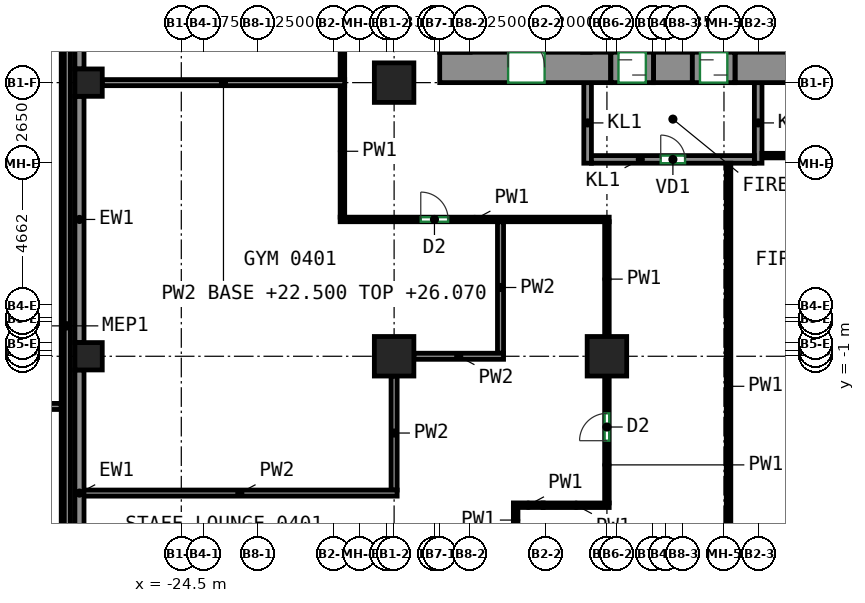
"""IFC4 building model, lengths in metres.
Left out: names, types, materials, properties, quantities, classifications, styles, units other than length and angle.
Written with IfcOpenShell. Run it as: python <this file> out.ifc"""

import sys

from ifc_helpers import new_model, si_unit, direction, frame, frame_2d, origin, origin_2d, place, context, subcontext, project, spatial, rectangle, extrude, source, transform, mapped, element, fill, save


model = new_model("IFC4")
c1 = context("Model", 3, precision=1e-05, world=origin(), true_north=direction((0.0, 1.0)))
c2 = subcontext(c1, "Body", "Model", "MODEL_VIEW")
j1 = project(units=[si_unit("LENGTHUNIT", "METRE"), si_unit("PLANEANGLEUNIT", "RADIAN")], contexts=[c1])
p1 = place(None, origin())
s1 = spatial("IfcSite", under=j1, at=p1, CompositionType="ELEMENT")
p2 = place(p1, origin())
s2 = spatial("IfcBuilding", under=s1, at=p2, CompositionType="ELEMENT")
p3 = place(p2, frame((0.0, 0.0, 22.5)))
s3 = spatial("IfcBuildingStorey", under=s2, at=p3, CompositionType="ELEMENT", Elevation=22.5)
m1 = source(origin(), c2, "Body", "SweptSolid", [
    extrude(rectangle(XDim=0.9, YDim=0.9, at=origin_2d()), origin(), (0.0, 0.0, 1.0), 4.22),
])
for number, where, z_axis, x_axis in (
    (1, (-27.55, -1.0, 0.0), (0.0, 0.0, 1.0), (1.0, 0.0, 0.0)),
    (2, (-27.55, 8.0, 0.0), (0.0, 0.0, 1.0), (1.0, 0.0, 0.0)),
):
    element("IfcColumn", number, at=place(p3, frame(where, z_axis=z_axis, x_axis=x_axis)), inside=s3, PredefinedType="COLUMN", context=c2, shape_type="MappedRepresentation", body=[
        mapped(m1, transform((0.0, 0.0, 0.0))),
    ])
m2 = source(origin(), c2, "Body", "SweptSolid", [
    extrude(rectangle(XDim=1.3, YDim=1.3, at=origin_2d()), origin(), (0.0, 0.0, 1.0), 4.22),
])
for number, where, z_axis, x_axis in (
    (3, (-17.5, -1.0, 0.0), (0.0, 0.0, 1.0), (1.0, 0.0, 0.0)),
    (4, (-17.5, 8.0, 0.0), (0.0, 0.0, 1.0), (1.0, 0.0, 0.0)),
    (5, (-10.5, -1.0, 0.0), (0.0, 0.0, 1.0), (1.0, 0.0, 0.0)),
):
    element("IfcColumn", number, at=place(p3, frame(where, z_axis=z_axis, x_axis=x_axis)), inside=s3, PredefinedType="COLUMN", context=c2, shape_type="MappedRepresentation", body=[
        mapped(m2, transform((0.0, 0.0, 0.0))),
    ])
m3 = source(origin(), c2, "Body", "SweptSolid", [
    extrude(rectangle(XDim=5.63, YDim=1.0, at=frame_2d((2.815, 0.0))), origin(), (0.0, 0.0, 1.0), 4.22),
])
p4 = place(p3, frame((-16.0, 8.5, 0.0), z_axis=(0.0, 0.0, 1.0), x_axis=(1.0, 0.0, 0.0)))
e6 = element("IfcWall", 6, at=p4, inside=s3, PredefinedType="SHEAR", context=c2, shape_type="MappedRepresentation", body=[
    mapped(m3, transform((0.0, 0.0, 0.0))),
])
p5 = place(p4, frame((2.25, 0.0, 0.0)))
e7 = element("IfcOpeningElement", 7, at=p5, cuts=e6, PredefinedType="OPENING", context=c2, shape_type="SweptSolid", body=[
    extrude(rectangle(XDim=1.2, YDim=2.1, at=frame_2d((0.6, 1.05))), frame((0.0, 0.51, 0.0), z_axis=(0.0, -1.0, 0.0), x_axis=(1.0, 0.0, 0.0)), (0.0, 0.0, 1.0), 1.02),
])
m4 = source(origin(), c2, "Body", "SweptSolid", [
    extrude(rectangle(XDim=1.28, YDim=1.0, at=frame_2d((0.64, 0.0))), origin(), (0.0, 0.0, 1.0), 4.22),
])
p6 = place(p3, frame((-8.97, 8.5, 0.0), z_axis=(0.0, 0.0, 1.0), x_axis=(1.0, 0.0, 0.0)))
e8 = element("IfcWall", 8, at=p6, inside=s3, PredefinedType="SHEAR", context=c2, shape_type="MappedRepresentation", body=[
    mapped(m4, transform((0.0, 0.0, 0.0))),
])
m5 = source(origin(), c2, "Body", "SweptSolid", [
    extrude(rectangle(XDim=14.18, YDim=1.0, at=frame_2d((7.09, 0.0))), origin(), (0.0, 0.0, 1.0), 4.22),
])
p7 = place(p3, frame((-6.29, 8.5, 0.0), z_axis=(0.0, 0.0, 1.0), x_axis=(1.0, 0.0, 0.0)))
e9 = element("IfcWall", 9, at=p7, inside=s3, PredefinedType="SHEAR", context=c2, shape_type="MappedRepresentation", body=[
    mapped(m5, transform((0.0, 0.0, 0.0))),
])
m6 = source(origin(), c2, "Body", "SweptSolid", [
    extrude(rectangle(XDim=1.4, YDim=1.0, at=frame_2d((0.7, 0.0))), origin(), (0.0, 0.0, 1.0), 0.32),
])
p8 = place(p3, frame((-10.37, 8.5, 3.9), z_axis=(0.0, 0.0, 1.0), x_axis=(1.0, 0.0, 0.0)))
e10 = element("IfcWall", 10, at=p8, inside=s3, PredefinedType="SHEAR", context=c2, shape_type="MappedRepresentation", body=[
    mapped(m6, transform((0.0, 0.0, 0.0))),
])
m7 = source(origin(), c2, "Body", "SweptSolid", [
    extrude(rectangle(XDim=1.4, YDim=1.0, at=frame_2d((0.7, 0.0))), origin(), (0.0, 0.0, 1.0), 0.27),
])
p9 = place(p3, frame((-7.69, 8.5, 3.95), z_axis=(0.0, 0.0, 1.0), x_axis=(1.0, 0.0, 0.0)))
e11 = element("IfcWall", 11, at=p9, inside=s3, PredefinedType="SHEAR", context=c2, shape_type="MappedRepresentation", body=[
    mapped(m7, transform((0.0, 0.0, 0.0))),
])
m8 = source(origin(), c2, "Body", "SweptSolid", [
    extrude(rectangle(XDim=15.282, YDim=0.3, at=frame_2d((7.641, 0.0))), origin(), (0.0, 0.0, 1.0), 4.22),
])
p10 = place(p3, frame((-27.85, 23.732, 0.0), z_axis=(0.0, 0.0, 1.0), x_axis=(0.0, -1.0, 0.0)))
e12 = element("IfcWall", 12, at=p10, inside=s3, PredefinedType="SOLIDWALL", context=c2, shape_type="MappedRepresentation", body=[
    mapped(m8, transform((0.0, 0.0, 0.0))),
])
m9 = source(origin(), c2, "Body", "SweptSolid", [
    extrude(rectangle(XDim=8.1, YDim=0.3, at=frame_2d((4.05, 0.0))), origin(), (0.0, 0.0, 1.0), 4.22),
])
for number, where, z_axis, x_axis in (
    (13, (-27.85, 7.55, 0.0), (0.0, 0.0, 1.0), (0.0, -1.0, 0.0)),
    (14, (-27.85, -1.45, 0.0), (0.0, 0.0, 1.0), (0.0, -1.0, 0.0)),
):
    element("IfcWall", number, at=place(p3, frame(where, z_axis=z_axis, x_axis=x_axis)), inside=s3, PredefinedType="SOLIDWALL", context=c2, shape_type="MappedRepresentation", body=[
        mapped(m9, transform((0.0, 0.0, 0.0))),
    ])
m10 = source(origin(), c2, "Body", "SweptSolid", [
    extrude(rectangle(XDim=56.3, YDim=0.3, at=frame_2d((28.15, 0.0))), origin(), (0.0, 0.0, 1.0), 4.22),
])
p11 = place(p3, frame((-28.3, 28.15, 0.0), z_axis=(0.0, 0.0, 1.0), x_axis=(0.0, -1.0, 0.0)))
e15 = element("IfcWall", 15, at=p11, inside=s3, PredefinedType="SOLIDWALL", context=c2, shape_type="MappedRepresentation", body=[
    mapped(m10, transform((0.0, 0.0, 0.0))),
])
m11 = source(origin(), c2, "Body", "SweptSolid", [
    extrude(rectangle(XDim=56.3, YDim=0.2, at=frame_2d((28.15, 0.0))), origin(), (0.0, 0.0, 1.0), 1.1),
])
p12 = place(p3, frame((-28.25, 28.15, 4.5), z_axis=(0.0, 0.0, 1.0), x_axis=(0.0, -1.0, 0.0)))
e16 = element("IfcWall", 16, at=p12, inside=s3, PredefinedType="PARAPET", context=c2, shape_type="MappedRepresentation", body=[
    mapped(m11, transform((0.0, 0.0, 0.0))),
])
m12 = source(origin(), c2, "Body", "SweptSolid", [
    extrude(rectangle(XDim=2.65, YDim=0.25, at=frame_2d((1.325, 0.0))), origin(), (0.0, 0.0, 1.0), 4.22),
])
for number, where, z_axis, x_axis in (
    (17, (-11.135, 5.35, 0.0), (0.0, 0.0, 1.0), (0.0, 1.0, 0.0)),
    (18, (-5.525, 5.35, 0.0), (0.0, 0.0, 1.0), (0.0, 1.0, 0.0)),
):
    element("IfcWall", number, at=place(p3, frame(where, z_axis=z_axis, x_axis=x_axis)), inside=s3, PredefinedType="PARTITIONING", context=c2, shape_type="MappedRepresentation", body=[
        mapped(m12, transform((0.0, 0.0, 0.0))),
    ])
m13 = source(origin(), c2, "Body", "SweptSolid", [
    extrude(rectangle(XDim=5.36, YDim=0.25, at=frame_2d((2.68, 0.0))), origin(), (0.0, 0.0, 1.0), 4.22),
])
p13 = place(p3, frame((-11.01, 5.475, 0.0), z_axis=(0.0, 0.0, 1.0), x_axis=(1.0, 0.0, 0.0)))
e19 = element("IfcWall", 19, at=p13, inside=s3, PredefinedType="PARTITIONING", context=c2, shape_type="MappedRepresentation", body=[
    mapped(m13, transform((0.0, 0.0, 0.0))),
])
p14 = place(p13, frame((2.28, 0.0, 0.0)))
e20 = element("IfcOpeningElement", 20, at=p14, cuts=e19, PredefinedType="OPENING", context=c2, shape_type="SweptSolid", body=[
    extrude(rectangle(XDim=0.8, YDim=2.0, at=frame_2d((0.4, 1.0))), frame((0.0, 0.135, 0.0), z_axis=(0.0, -1.0, 0.0), x_axis=(1.0, 0.0, 0.0)), (0.0, 0.0, 1.0), 0.27),
])
m14 = source(origin(), c2, "Body", "SweptSolid", [
    extrude(rectangle(XDim=1.4, YDim=1.0, at=frame_2d((0.7, 0.0))), origin(), (0.0, 0.0, 1.0), 2.7),
])
p15 = place(p3, frame((-10.37, 8.5, 0.0), z_axis=(0.0, 0.0, 1.0), x_axis=(1.0, 0.0, 0.0)))
e21 = element("IfcWall", 21, at=p15, inside=s3, PredefinedType="PARTITIONING", context=c2, shape_type="MappedRepresentation", body=[
    mapped(m14, transform((0.0, 0.0, 0.0))),
])
p16 = place(p15, frame((0.25, 0.0, 0.0)))
e22 = element("IfcOpeningElement", 22, at=p16, cuts=e21, PredefinedType="OPENING", context=c2, shape_type="SweptSolid", body=[
    extrude(rectangle(XDim=0.9, YDim=2.1, at=frame_2d((0.45, 1.05))), frame((0.0, 0.51, 0.0), z_axis=(0.0, -1.0, 0.0), x_axis=(1.0, 0.0, 0.0)), (0.0, 0.0, 1.0), 1.02),
])
m15 = source(origin(), c2, "Body", "SweptSolid", [
    extrude(rectangle(XDim=1.4, YDim=1.0, at=frame_2d((0.7, 0.0))), origin(), (0.0, 0.0, 1.0), 2.7),
])
p17 = place(p3, frame((-7.69, 8.5, 0.0), z_axis=(0.0, 0.0, 1.0), x_axis=(1.0, 0.0, 0.0)))
e23 = element("IfcWall", 23, at=p17, inside=s3, PredefinedType="PARTITIONING", context=c2, shape_type="MappedRepresentation", body=[
    mapped(m15, transform((0.0, 0.0, 0.0))),
])
p18 = place(p17, frame((0.25, 0.0, 0.0)))
e24 = element("IfcOpeningElement", 24, at=p18, cuts=e23, PredefinedType="OPENING", context=c2, shape_type="SweptSolid", body=[
    extrude(rectangle(XDim=0.9, YDim=2.1, at=frame_2d((0.45, 1.05))), frame((0.0, 0.51, 0.0), z_axis=(0.0, -1.0, 0.0), x_axis=(1.0, 0.0, 0.0)), (0.0, 0.0, 1.0), 1.02),
])
p19 = place(p3, frame((-19.275, 3.5, 0.0), z_axis=(0.0, 0.0, 1.0), x_axis=(1.0, 0.0, 0.0)))
e25 = element("IfcWall", 25, at=p19, inside=s3, PredefinedType="PARTITIONING", context=c2, shape_type="SweptSolid", body=[
    extrude(rectangle(XDim=8.85, YDim=0.15, at=frame_2d((4.425, 0.0))), origin(), (0.0, 0.0, 1.0), 4.22),
])
p20 = place(p19, frame((2.652, 0.0, 0.0)))
e26 = element("IfcOpeningElement", 26, at=p20, cuts=e25, PredefinedType="OPENING", context=c2, shape_type="SweptSolid", body=[
    extrude(rectangle(XDim=0.9, YDim=2.1, at=frame_2d((0.45, 1.05))), frame((0.0, 0.085, 0.0), z_axis=(0.0, -1.0, 0.0), x_axis=(1.0, 0.0, 0.0)), (0.0, 0.0, 1.0), 0.17),
])
p21 = place(p3, frame((-19.2, 3.575, 0.0), z_axis=(0.0, 0.0, 1.0), x_axis=(0.0, 1.0, 0.0)))
e27 = element("IfcWall", 27, at=p21, inside=s3, PredefinedType="PARTITIONING", context=c2, shape_type="SweptSolid", body=[
    extrude(rectangle(XDim=4.335, YDim=0.15, at=frame_2d((2.167, 0.0))), origin(), (0.0, 0.0, 1.0), 4.22),
])
p22 = place(p3, frame((-12.598, -5.898, 0.0), z_axis=(0.0, 0.0, 1.0), x_axis=(-1.0, 0.0, 0.0)))
e28 = element("IfcWall", 28, at=p22, inside=s3, PredefinedType="PARTITIONING", context=c2, shape_type="SweptSolid", body=[
    extrude(rectangle(XDim=0.979, YDim=0.15, at=frame_2d((0.49, 0.0))), origin(), (0.0, 0.0, 1.0), 4.22),
])
p23 = place(p3, frame((-10.425, -5.9, 0.0), z_axis=(0.0, 0.0, 1.0), x_axis=(-1.0, 0.0, 0.0)))
e29 = element("IfcWall", 29, at=p23, inside=s3, PredefinedType="PARTITIONING", context=c2, shape_type="SweptSolid", body=[
    extrude(rectangle(XDim=2.173, YDim=0.15, at=frame_2d((1.086, 0.0))), origin(), (0.0, 0.0, 1.0), 4.22),
])
p24 = place(p3, frame((-10.5, -5.825, 0.0), z_axis=(0.0, 0.0, 1.0), x_axis=(0.0, 1.0, 0.0)))
e30 = element("IfcWall", 30, at=p24, inside=s3, PredefinedType="PARTITIONING", context=c2, shape_type="SweptSolid", body=[
    extrude(rectangle(XDim=4.175, YDim=0.15, at=frame_2d((2.087, 0.0))), origin(), (0.0, 0.0, 1.0), 3.57),
])
p25 = place(p24, frame((2.048, 0.0, 0.0)))
e31 = element("IfcOpeningElement", 31, at=p25, cuts=e30, PredefinedType="OPENING", context=c2, shape_type="SweptSolid", body=[
    extrude(rectangle(XDim=0.9, YDim=2.1, at=frame_2d((0.45, 1.05))), frame((0.0, 0.085, 0.0), z_axis=(0.0, -1.0, 0.0), x_axis=(1.0, 0.0, 0.0)), (0.0, 0.0, 1.0), 0.17),
])
p26 = place(p3, frame((-10.5, -0.35, 0.0), z_axis=(0.0, 0.0, 1.0), x_axis=(0.0, 1.0, 0.0)))
e32 = element("IfcWall", 32, at=p26, inside=s3, PredefinedType="PARTITIONING", context=c2, shape_type="SweptSolid", body=[
    extrude(rectangle(XDim=3.775, YDim=0.15, at=frame_2d((1.888, 0.0))), origin(), (0.0, 0.0, 1.0), 4.22),
])
p27 = place(p3, frame((-13.502, -5.973, 0.0), z_axis=(0.0, 0.0, 1.0), x_axis=(0.0, -1.0, 0.0)))
e33 = element("IfcWall", 33, at=p27, inside=s3, PredefinedType="PARTITIONING", context=c2, shape_type="SweptSolid", body=[
    extrude(rectangle(XDim=0.829, YDim=0.15, at=frame_2d((0.415, 0.0))), origin(), (0.0, 0.0, 1.0), 4.22),
])
p28 = place(p3, frame((-19.2, 8.09, 0.0), z_axis=(0.0, 0.0, 1.0), x_axis=(0.0, 1.0, 0.0)))
e34 = element("IfcWall", 34, at=p28, inside=s3, PredefinedType="PARTITIONING", context=c2, shape_type="SweptSolid", body=[
    extrude(rectangle(XDim=13.82, YDim=0.15, at=frame_2d((6.91, 0.0))), origin(), (0.0, 0.0, 1.0), 4.22),
])
p29 = place(p28, frame((4.206, 0.0, 0.0)))
e35 = element("IfcOpeningElement", 35, at=p29, cuts=e34, PredefinedType="OPENING", context=c2, shape_type="SweptSolid", body=[
    extrude(rectangle(XDim=0.9, YDim=2.1, at=frame_2d((0.45, 1.05))), frame((0.0, 0.085, 0.0), z_axis=(0.0, -1.0, 0.0), x_axis=(1.0, 0.0, 0.0)), (0.0, 0.0, 1.0), 0.17),
])
p30 = place(p3, frame((-6.5, -9.325, 0.0), z_axis=(0.0, 0.0, 1.0), x_axis=(0.0, 1.0, 0.0)))
e36 = element("IfcWall", 36, at=p30, inside=s3, PredefinedType="PARTITIONING", context=c2, shape_type="SweptSolid", body=[
    extrude(rectangle(XDim=14.675, YDim=0.15, at=frame_2d((7.337, 0.0))), origin(), (0.0, 0.0, 1.0), 4.22),
])
p31 = place(p3, frame((-5.4, 5.6, 0.0), z_axis=(0.0, 0.0, 1.0), x_axis=(1.0, 0.0, 0.0)))
e37 = element("IfcWall", 37, at=p31, inside=s3, PredefinedType="PARTITIONING", context=c2, shape_type="SweptSolid", body=[
    extrude(rectangle(XDim=13.975, YDim=0.15, at=frame_2d((6.987, 0.0))), origin(), (0.0, 0.0, 1.0), 4.22),
])
p32 = place(p3, frame((-14.0, -0.9, 0.0), z_axis=(0.0, 0.0, 1.0), x_axis=(0.0, 1.0, 0.0)))
e38 = element("IfcWall", 38, at=p32, inside=s3, PredefinedType="PARTITIONING", context=c2, shape_type="SweptSolid", body=[
    extrude(rectangle(XDim=4.324, YDim=0.2, at=frame_2d((2.162, 0.0))), origin(), (0.0, 0.0, 1.0), 4.22),
])
p33 = place(p3, frame((-16.85, -1.0, 0.0), z_axis=(0.0, 0.0, 1.0), x_axis=(1.0, 0.0, 0.0)))
e39 = element("IfcWall", 39, at=p33, inside=s3, PredefinedType="PARTITIONING", context=c2, shape_type="SweptSolid", body=[
    extrude(rectangle(XDim=2.95, YDim=0.2, at=frame_2d((1.475, 0.0))), origin(), (0.0, 0.0, 1.0), 4.22),
])
p34 = place(p3, frame((-17.5, -5.4, 0.0), z_axis=(0.0, 0.0, 1.0), x_axis=(0.0, 1.0, 0.0)))
e40 = element("IfcWall", 40, at=p34, inside=s3, PredefinedType="PARTITIONING", context=c2, shape_type="SweptSolid", body=[
    extrude(rectangle(XDim=3.75, YDim=0.2, at=frame_2d((1.875, 0.0))), origin(), (0.0, 0.0, 1.0), 4.22),
])
p35 = place(p3, frame((-27.75, -5.5, 0.0), z_axis=(0.0, 0.0, 1.0), x_axis=(1.0, 0.0, 0.0)))
e41 = element("IfcWall", 41, at=p35, inside=s3, PredefinedType="PARTITIONING", context=c2, shape_type="SweptSolid", body=[
    extrude(rectangle(XDim=10.35, YDim=0.2, at=frame_2d((5.175, 0.0))), origin(), (0.0, 0.0, 1.0), 4.22),
])
p36 = place(p3, frame((-27.1, 8.0, 0.0), z_axis=(0.0, 0.0, 1.0), x_axis=(1.0, 0.0, 0.0)))
e42 = element("IfcWall", 42, at=p36, inside=s3, PredefinedType="PARTITIONING", context=c2, shape_type="SweptSolid", body=[
    extrude(rectangle(XDim=7.974, YDim=0.2, at=frame_2d((3.987, 0.0))), origin(), (0.0, 0.0, 1.0), 3.57),
])
m16 = source(origin(), c2, "Body", "SweptSolid", [
    extrude(rectangle(XDim=10.1, YDim=0.2, at=frame_2d((5.05, 0.0))), origin(), (0.0, 0.0, 1.0), 3.42),
])
p37 = place(p3, frame((-38.55, -2.65, 0.0), z_axis=(0.0, 0.0, 1.0), x_axis=(1.0, 0.0, 0.0)))
e43 = element("IfcWall", 43, at=p37, inside=s3, PredefinedType="PARTITIONING", context=c2, shape_type="MappedRepresentation", body=[
    mapped(m16, transform((0.0, 0.0, 0.0))),
])
p38 = place(p14, origin())
e44 = element("IfcDoor", 44, at=p38, inside=s3, OperationType="SINGLE_SWING_LEFT", PredefinedType="DOOR", context=c2, shape_type="SweptSolid", body=[
    extrude(rectangle(XDim=0.8, YDim=2.0, at=frame_2d((0.4, 1.0))), frame((0.0, 0.025, 0.0), z_axis=(0.0, -1.0, 0.0), x_axis=(1.0, 0.0, 0.0)), (0.0, 0.0, 1.0), 0.05),
])
fill(e20, e44)
p39 = place(p16, origin())
e45 = element("IfcDoor", 45, at=p39, inside=s3, OperationType="SLIDING_TO_LEFT", PredefinedType="DOOR", context=c2, shape_type="SweptSolid", body=[
    extrude(rectangle(XDim=0.9, YDim=2.1, at=frame_2d((0.45, 1.05))), frame((0.0, 0.405, 0.0), z_axis=(0.0, -1.0, 0.0), x_axis=(1.0, 0.0, 0.0)), (0.0, 0.0, 1.0), 0.05),
])
fill(e22, e45)
p40 = place(p18, origin())
e46 = element("IfcDoor", 46, at=p40, inside=s3, OperationType="SLIDING_TO_RIGHT", PredefinedType="DOOR", context=c2, shape_type="SweptSolid", body=[
    extrude(rectangle(XDim=0.9, YDim=2.1, at=frame_2d((0.45, 1.05))), frame((0.0, 0.405, 0.0), z_axis=(0.0, -1.0, 0.0), x_axis=(1.0, 0.0, 0.0)), (0.0, 0.0, 1.0), 0.05),
])
fill(e24, e46)
p41 = place(p5, origin())
e47 = element("IfcDoor", 47, at=p41, inside=s3, OperationType="DOUBLE_DOOR_SINGLE_SWING", PredefinedType="DOOR", context=c2, shape_type="SweptSolid", body=[
    extrude(rectangle(XDim=1.2, YDim=2.1, at=frame_2d((0.6, 1.05))), frame((0.0, 0.405, 0.0), z_axis=(0.0, -1.0, 0.0), x_axis=(1.0, 0.0, 0.0)), (0.0, 0.0, 1.0), 0.05),
])
fill(e7, e47)
p42 = place(p25, origin())
e48 = element("IfcDoor", 48, at=p42, inside=s3, OperationType="SINGLE_SWING_LEFT", PredefinedType="DOOR", context=c2, shape_type="SweptSolid", body=[
    extrude(rectangle(XDim=0.9, YDim=2.1, at=frame_2d((0.45, 1.05))), frame((0.0, 0.025, 0.0), z_axis=(0.0, -1.0, 0.0), x_axis=(1.0, 0.0, 0.0)), (0.0, 0.0, 1.0), 0.05),
])
fill(e31, e48)
p43 = place(p20, origin())
e49 = element("IfcDoor", 49, at=p43, inside=s3, OperationType="SINGLE_SWING_LEFT", PredefinedType="DOOR", context=c2, shape_type="SweptSolid", body=[
    extrude(rectangle(XDim=0.9, YDim=2.1, at=frame_2d((0.45, 1.05))), frame((0.0, 0.025, 0.0), z_axis=(0.0, -1.0, 0.0), x_axis=(1.0, 0.0, 0.0)), (0.0, 0.0, 1.0), 0.05),
])
fill(e26, e49)
save(model, sys.argv[1])
